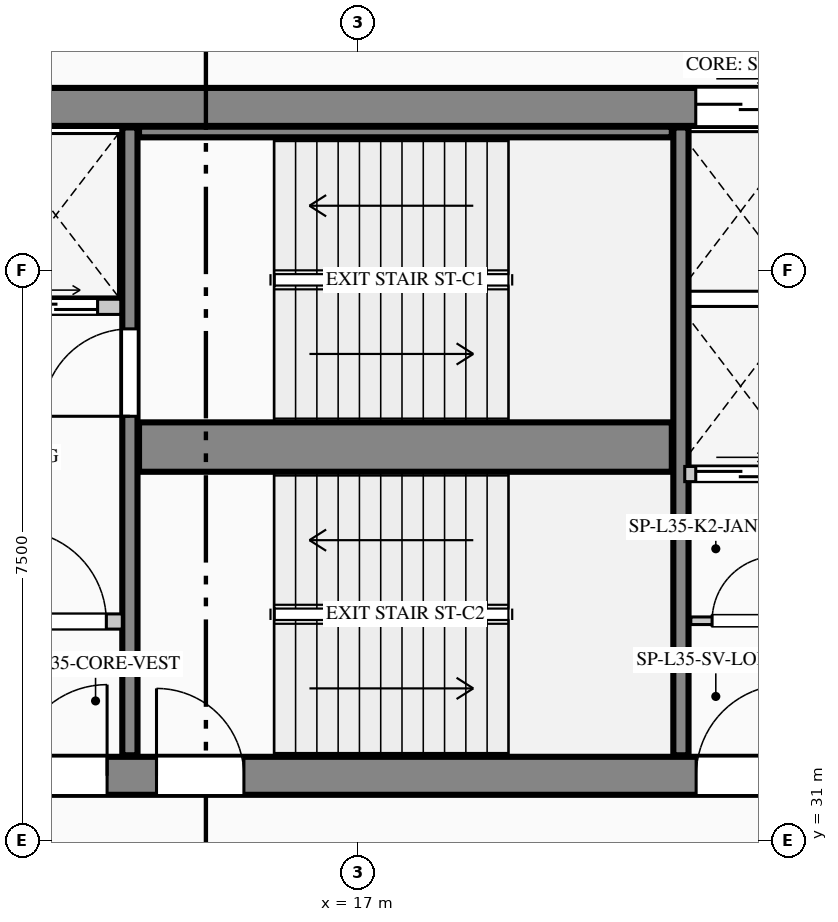
"""IFC4 building model, lengths in metres.
Left out: names, types, materials, properties, quantities, classifications, styles, units other than length and angle.
Written with IfcOpenShell. Run it as: python <this file> out.ifc"""

import sys

from ifc_helpers import new_model, si_unit, direction, frame, frame_2d, origin, place, context, subcontext, project, spatial, rectangle, extrude, element, fill, save


model = new_model("IFC4")
c1 = context("Model", 3, precision=1e-05, world=origin(), true_north=direction((0.0, 1.0)))
c2 = subcontext(c1, "Body", "Model", "MODEL_VIEW")
j1 = project(units=[si_unit("LENGTHUNIT", "METRE"), si_unit("PLANEANGLEUNIT", "RADIAN")], contexts=[c1])
p1 = place(None, origin())
s1 = spatial("IfcSite", under=j1, at=p1, CompositionType="ELEMENT")
p2 = place(p1, origin())
s2 = spatial("IfcBuilding", under=s1, at=p2, CompositionType="ELEMENT")
p3 = place(p2, frame((0.0, 0.0, 150.9)))
s3 = spatial("IfcBuildingStorey", under=s2, at=p3, CompositionType="ELEMENT", Elevation=150.9)
p4 = place(p3, frame((5.5, 40.65, 0.0), z_axis=(0.0, 0.0, 1.0), x_axis=(1.0, 0.0, 0.0)))
e1 = element("IfcWall", 1, at=p4, inside=s3, PredefinedType="SHEAR", context=c2, shape_type="SweptSolid", body=[
    extrude(rectangle(XDim=17.85, YDim=0.5, at=frame_2d((8.925, 0.0))), origin(), (0.0, 0.0, 1.0), 3.95),
])
p5 = place(p4, frame((15.945, 0.0, 0.0)))
e2 = element("IfcOpeningElement", 2, at=p5, cuts=e1, PredefinedType="OPENING", context=c2, shape_type="SweptSolid", body=[
    extrude(rectangle(XDim=1.18, YDim=2.25, at=frame_2d((0.59, 1.125))), frame((0.0, 0.26, 0.0), z_axis=(0.0, -1.0, 0.0), x_axis=(1.0, 0.0, 0.0)), (0.0, 0.0, 1.0), 0.52),
])
p6 = place(p3, frame((5.5, 31.85, 0.0), z_axis=(0.0, 0.0, 1.0), x_axis=(1.0, 0.0, 0.0)))
e3 = element("IfcWall", 3, at=p6, inside=s3, PredefinedType="SHEAR", context=c2, shape_type="SweptSolid", body=[
    extrude(rectangle(XDim=17.85, YDim=0.5, at=frame_2d((8.925, 0.0))), origin(), (0.0, 0.0, 1.0), 3.95),
])
p7 = place(p6, frame((3.15, 0.0, 0.0)))
e4 = element("IfcOpeningElement", 4, at=p7, cuts=e3, PredefinedType="OPENING", context=c2, shape_type="SweptSolid", body=[
    extrude(rectangle(XDim=1.2, YDim=2.2, at=frame_2d((0.6, 1.1))), frame((0.0, 0.26, 0.0), z_axis=(0.0, -1.0, 0.0), x_axis=(1.0, 0.0, 0.0)), (0.0, 0.0, 1.0), 0.52),
])
p8 = place(p6, frame((7.0, 0.0, 0.0)))
e5 = element("IfcOpeningElement", 5, at=p8, cuts=e3, PredefinedType="OPENING", context=c2, shape_type="SweptSolid", body=[
    extrude(rectangle(XDim=1.2, YDim=2.2, at=frame_2d((0.6, 1.1))), frame((0.0, 0.26, 0.0), z_axis=(0.0, -1.0, 0.0), x_axis=(1.0, 0.0, 0.0)), (0.0, 0.0, 1.0), 0.52),
])
p9 = place(p6, frame((8.85, 0.0, 0.0)))
e6 = element("IfcOpeningElement", 6, at=p9, cuts=e3, PredefinedType="OPENING", context=c2, shape_type="SweptSolid", body=[
    extrude(rectangle(XDim=1.15, YDim=2.2, at=frame_2d((0.575, 1.1))), frame((0.0, 0.26, 0.0), z_axis=(0.0, -1.0, 0.0), x_axis=(1.0, 0.0, 0.0)), (0.0, 0.0, 1.0), 0.52),
])
p10 = place(p6, frame((15.95, 0.0, 0.0)))
e7 = element("IfcOpeningElement", 7, at=p10, cuts=e3, PredefinedType="OPENING", context=c2, shape_type="SweptSolid", body=[
    extrude(rectangle(XDim=1.2, YDim=2.2, at=frame_2d((0.6, 1.1))), frame((0.0, 0.26, 0.0), z_axis=(0.0, -1.0, 0.0), x_axis=(1.0, 0.0, 0.0)), (0.0, 0.0, 1.0), 0.52),
])
p11 = place(p3, frame((14.0, 32.12, 0.0), z_axis=(0.0, 0.0, 1.0), x_axis=(0.0, 1.0, 0.0)))
e8 = element("IfcWall", 8, at=p11, inside=s3, PredefinedType="SHEAR", context=c2, shape_type="SweptSolid", body=[
    extrude(rectangle(XDim=8.26, YDim=0.2, at=frame_2d((4.13, 0.0))), origin(), (0.0, 0.0, 1.0), 3.95),
])
p12 = place(p11, frame((4.46, 0.0, 0.0)))
e9 = element("IfcOpeningElement", 9, at=p12, cuts=e8, PredefinedType="OPENING", context=c2, shape_type="SweptSolid", body=[
    extrude(rectangle(XDim=1.15, YDim=2.2, at=frame_2d((0.575, 1.1))), frame((0.0, 0.11, 0.0), z_axis=(0.0, -1.0, 0.0), x_axis=(1.0, 0.0, 0.0)), (0.0, 0.0, 1.0), 0.22),
])
p13 = place(p3, frame((14.12, 36.175, 0.0), z_axis=(0.0, 0.0, 1.0), x_axis=(1.0, 0.0, 0.0)))
e10 = element("IfcWall", 10, at=p13, inside=s3, PredefinedType="SHEAR", context=c2, shape_type="SweptSolid", body=[
    extrude(rectangle(XDim=7.01, YDim=0.65, at=frame_2d((3.505, 0.0))), origin(), (0.0, 0.0, 1.0), 3.95),
])
p14 = place(p3, frame((21.25, 32.12, 0.0), z_axis=(0.0, 0.0, 1.0), x_axis=(0.0, 1.0, 0.0)))
e11 = element("IfcWall", 11, at=p14, inside=s3, PredefinedType="SHEAR", context=c2, shape_type="SweptSolid", body=[
    extrude(rectangle(XDim=8.26, YDim=0.2, at=frame_2d((4.13, 0.0))), origin(), (0.0, 0.0, 1.0), 3.95),
])
p15 = place(p3, frame((14.12, 40.32, 0.0), z_axis=(0.0, 0.0, 1.0), x_axis=(1.0, 0.0, 0.0)))
e12 = element("IfcWall", 12, at=p15, inside=s3, PredefinedType="SHEAR", context=c2, shape_type="SweptSolid", body=[
    extrude(rectangle(XDim=7.01, YDim=0.14, at=frame_2d((3.505, 0.0))), origin(), (0.0, 0.0, 1.0), 3.95),
])
p16 = place(p3, frame((10.34, 38.02, 0.0), z_axis=(0.0, 0.0, 1.0), x_axis=(1.0, 0.0, 0.0)))
e13 = element("IfcWall", 13, at=p16, inside=s3, PredefinedType="PARTITIONING", context=c2, shape_type="SweptSolid", body=[
    extrude(rectangle(XDim=3.54, YDim=0.2, at=frame_2d((1.77, 0.0))), origin(), (0.0, 0.0, 1.0), 3.69),
])
p17 = place(p16, frame((0.285, 0.0, 0.0)))
e14 = element("IfcOpeningElement", 14, at=p17, cuts=e13, PredefinedType="OPENING", context=c2, shape_type="SweptSolid", body=[
    extrude(rectangle(XDim=1.1, YDim=2.2, at=frame_2d((0.55, 1.1))), frame((0.0, 0.11, 0.0), z_axis=(0.0, -1.0, 0.0), x_axis=(1.0, 0.0, 0.0)), (0.0, 0.0, 1.0), 0.22),
])
p18 = place(p16, frame((2.135, 0.0, 0.0)))
e15 = element("IfcOpeningElement", 15, at=p18, cuts=e13, PredefinedType="OPENING", context=c2, shape_type="SweptSolid", body=[
    extrude(rectangle(XDim=1.1, YDim=2.2, at=frame_2d((0.55, 1.1))), frame((0.0, 0.11, 0.0), z_axis=(0.0, -1.0, 0.0), x_axis=(1.0, 0.0, 0.0)), (0.0, 0.0, 1.0), 0.22),
])
p19 = place(p3, frame((10.34, 33.88, 0.0), z_axis=(0.0, 0.0, 1.0), x_axis=(1.0, 0.0, 0.0)))
e16 = element("IfcWall", 16, at=p19, inside=s3, PredefinedType="PARTITIONING", context=c2, shape_type="SweptSolid", body=[
    extrude(rectangle(XDim=3.56, YDim=0.2, at=frame_2d((1.78, 0.0))), origin(), (0.0, 0.0, 1.0), 3.69),
])
p20 = place(p19, frame((2.15, 0.0, 0.0)))
e17 = element("IfcOpeningElement", 17, at=p20, cuts=e16, PredefinedType="OPENING", context=c2, shape_type="SweptSolid", body=[
    extrude(rectangle(XDim=1.2, YDim=2.2, at=frame_2d((0.6, 1.1))), frame((0.0, 0.11, 0.0), z_axis=(0.0, -1.0, 0.0), x_axis=(1.0, 0.0, 0.0)), (0.0, 0.0, 1.0), 0.22),
])
p21 = place(p3, frame((21.38, 33.89, 0.0), z_axis=(0.0, 0.0, 1.0), x_axis=(1.0, 0.0, 0.0)))
e18 = element("IfcWall", 18, at=p21, inside=s3, PredefinedType="PARTITIONING", context=c2, shape_type="SweptSolid", body=[
    extrude(rectangle(XDim=1.42, YDim=0.1, at=frame_2d((0.71, 0.0))), origin(), (0.0, 0.0, 1.0), 3.69),
])
p22 = place(p21, frame((0.28, 0.0, 0.0)))
e19 = element("IfcOpeningElement", 19, at=p22, cuts=e18, PredefinedType="OPENING", context=c2, shape_type="SweptSolid", body=[
    extrude(rectangle(XDim=0.85, YDim=2.1, at=frame_2d((0.425, 1.05))), frame((0.0, 0.06, 0.0), z_axis=(0.0, -1.0, 0.0), x_axis=(1.0, 0.0, 0.0)), (0.0, 0.0, 1.0), 0.12),
])
p23 = place(p3, frame((21.3, 35.82, 0.0), z_axis=(0.0, 0.0, 1.0), x_axis=(1.0, 0.0, 0.0)))
e20 = element("IfcWall", 20, at=p23, inside=s3, PredefinedType="PARTITIONING", context=c2, shape_type="SweptSolid", body=[
    extrude(rectangle(XDim=1.5, YDim=0.2, at=frame_2d((0.75, 0.0))), origin(), (0.0, 0.0, 1.0), 3.69),
])
p24 = place(p23, frame((0.145, 0.0, 0.0)))
e21 = element("IfcOpeningElement", 21, at=p24, cuts=e20, PredefinedType="OPENING", context=c2, shape_type="SweptSolid", body=[
    extrude(rectangle(XDim=1.18, YDim=2.25, at=frame_2d((0.59, 1.125))), frame((0.0, 0.11, 0.0), z_axis=(0.0, -1.0, 0.0), x_axis=(1.0, 0.0, 0.0)), (0.0, 0.0, 1.0), 0.22),
])
p25 = place(p8, origin())
e22 = element("IfcDoor", 22, at=p25, inside=s3, OperationType="SINGLE_SWING_RIGHT", PredefinedType="DOOR", context=c2, shape_type="SweptSolid", body=[
    extrude(rectangle(XDim=1.2, YDim=2.2, at=frame_2d((0.6, 1.1))), frame((0.0, 0.025, 0.0), z_axis=(0.0, -1.0, 0.0), x_axis=(1.0, 0.0, 0.0)), (0.0, 0.0, 1.0), 0.05),
])
fill(e5, e22)
p26 = place(p9, origin())
e23 = element("IfcDoor", 23, at=p26, inside=s3, OperationType="SINGLE_SWING_LEFT", PredefinedType="DOOR", context=c2, shape_type="SweptSolid", body=[
    extrude(rectangle(XDim=1.15, YDim=2.2, at=frame_2d((0.575, 1.1))), frame((0.0, 0.025, 0.0), z_axis=(0.0, -1.0, 0.0), x_axis=(1.0, 0.0, 0.0)), (0.0, 0.0, 1.0), 0.05),
])
fill(e6, e23)
p27 = place(p10, origin())
e24 = element("IfcDoor", 24, at=p27, inside=s3, OperationType="SINGLE_SWING_RIGHT", PredefinedType="DOOR", context=c2, shape_type="SweptSolid", body=[
    extrude(rectangle(XDim=1.2, YDim=2.2, at=frame_2d((0.6, 1.1))), frame((0.0, 0.025, 0.0), z_axis=(0.0, -1.0, 0.0), x_axis=(1.0, 0.0, 0.0)), (0.0, 0.0, 1.0), 0.05),
])
fill(e7, e24)
p28 = place(p20, origin())
e25 = element("IfcDoor", 25, at=p28, inside=s3, OperationType="SINGLE_SWING_LEFT", PredefinedType="DOOR", context=c2, shape_type="SweptSolid", body=[
    extrude(rectangle(XDim=1.2, YDim=2.2, at=frame_2d((0.6, 1.1))), frame((0.0, 0.025, 0.0), z_axis=(0.0, -1.0, 0.0), x_axis=(1.0, 0.0, 0.0)), (0.0, 0.0, 1.0), 0.05),
])
fill(e17, e25)
p29 = place(p22, origin())
e26 = element("IfcDoor", 26, at=p29, inside=s3, OperationType="SINGLE_SWING_RIGHT", PredefinedType="DOOR", context=c2, shape_type="SweptSolid", body=[
    extrude(rectangle(XDim=0.85, YDim=2.1, at=frame_2d((0.425, 1.05))), frame((0.0, 0.025, 0.0), z_axis=(0.0, -1.0, 0.0), x_axis=(1.0, 0.0, 0.0)), (0.0, 0.0, 1.0), 0.05),
])
fill(e19, e26)
p30 = place(p12, origin())
e27 = element("IfcDoor", 27, at=p30, inside=s3, OperationType="SINGLE_SWING_LEFT", PredefinedType="DOOR", context=c2, shape_type="SweptSolid", body=[
    extrude(rectangle(XDim=1.15, YDim=2.2, at=frame_2d((0.575, 1.1))), frame((0.0, 0.025, 0.0), z_axis=(0.0, -1.0, 0.0), x_axis=(1.0, 0.0, 0.0)), (0.0, 0.0, 1.0), 0.05),
])
fill(e9, e27)
p31 = place(p18, origin())
e28 = element("IfcDoor", 28, at=p31, inside=s3, OperationType="DOUBLE_DOOR_SLIDING", PredefinedType="DOOR", context=c2, shape_type="SweptSolid", body=[
    extrude(rectangle(XDim=1.1, YDim=2.2, at=frame_2d((0.55, 1.1))), frame((0.0, 0.025, 0.0), z_axis=(0.0, -1.0, 0.0), x_axis=(1.0, 0.0, 0.0)), (0.0, 0.0, 1.0), 0.05),
])
fill(e15, e28)
p32 = place(p5, origin())
e29 = element("IfcDoor", 29, at=p32, inside=s3, OperationType="DOUBLE_DOOR_SLIDING", PredefinedType="DOOR", context=c2, shape_type="SweptSolid", body=[
    extrude(rectangle(XDim=1.18, YDim=2.25, at=frame_2d((0.59, 1.125))), frame((0.0, 0.025, 0.0), z_axis=(0.0, -1.0, 0.0), x_axis=(1.0, 0.0, 0.0)), (0.0, 0.0, 1.0), 0.05),
])
fill(e2, e29)
p33 = place(p24, origin())
e30 = element("IfcDoor", 30, at=p33, inside=s3, OperationType="DOUBLE_DOOR_SLIDING", PredefinedType="DOOR", context=c2, shape_type="SweptSolid", body=[
    extrude(rectangle(XDim=1.18, YDim=2.25, at=frame_2d((0.59, 1.125))), frame((0.0, 0.025, 0.0), z_axis=(0.0, -1.0, 0.0), x_axis=(1.0, 0.0, 0.0)), (0.0, 0.0, 1.0), 0.05),
])
fill(e21, e30)
save(model, sys.argv[1])
